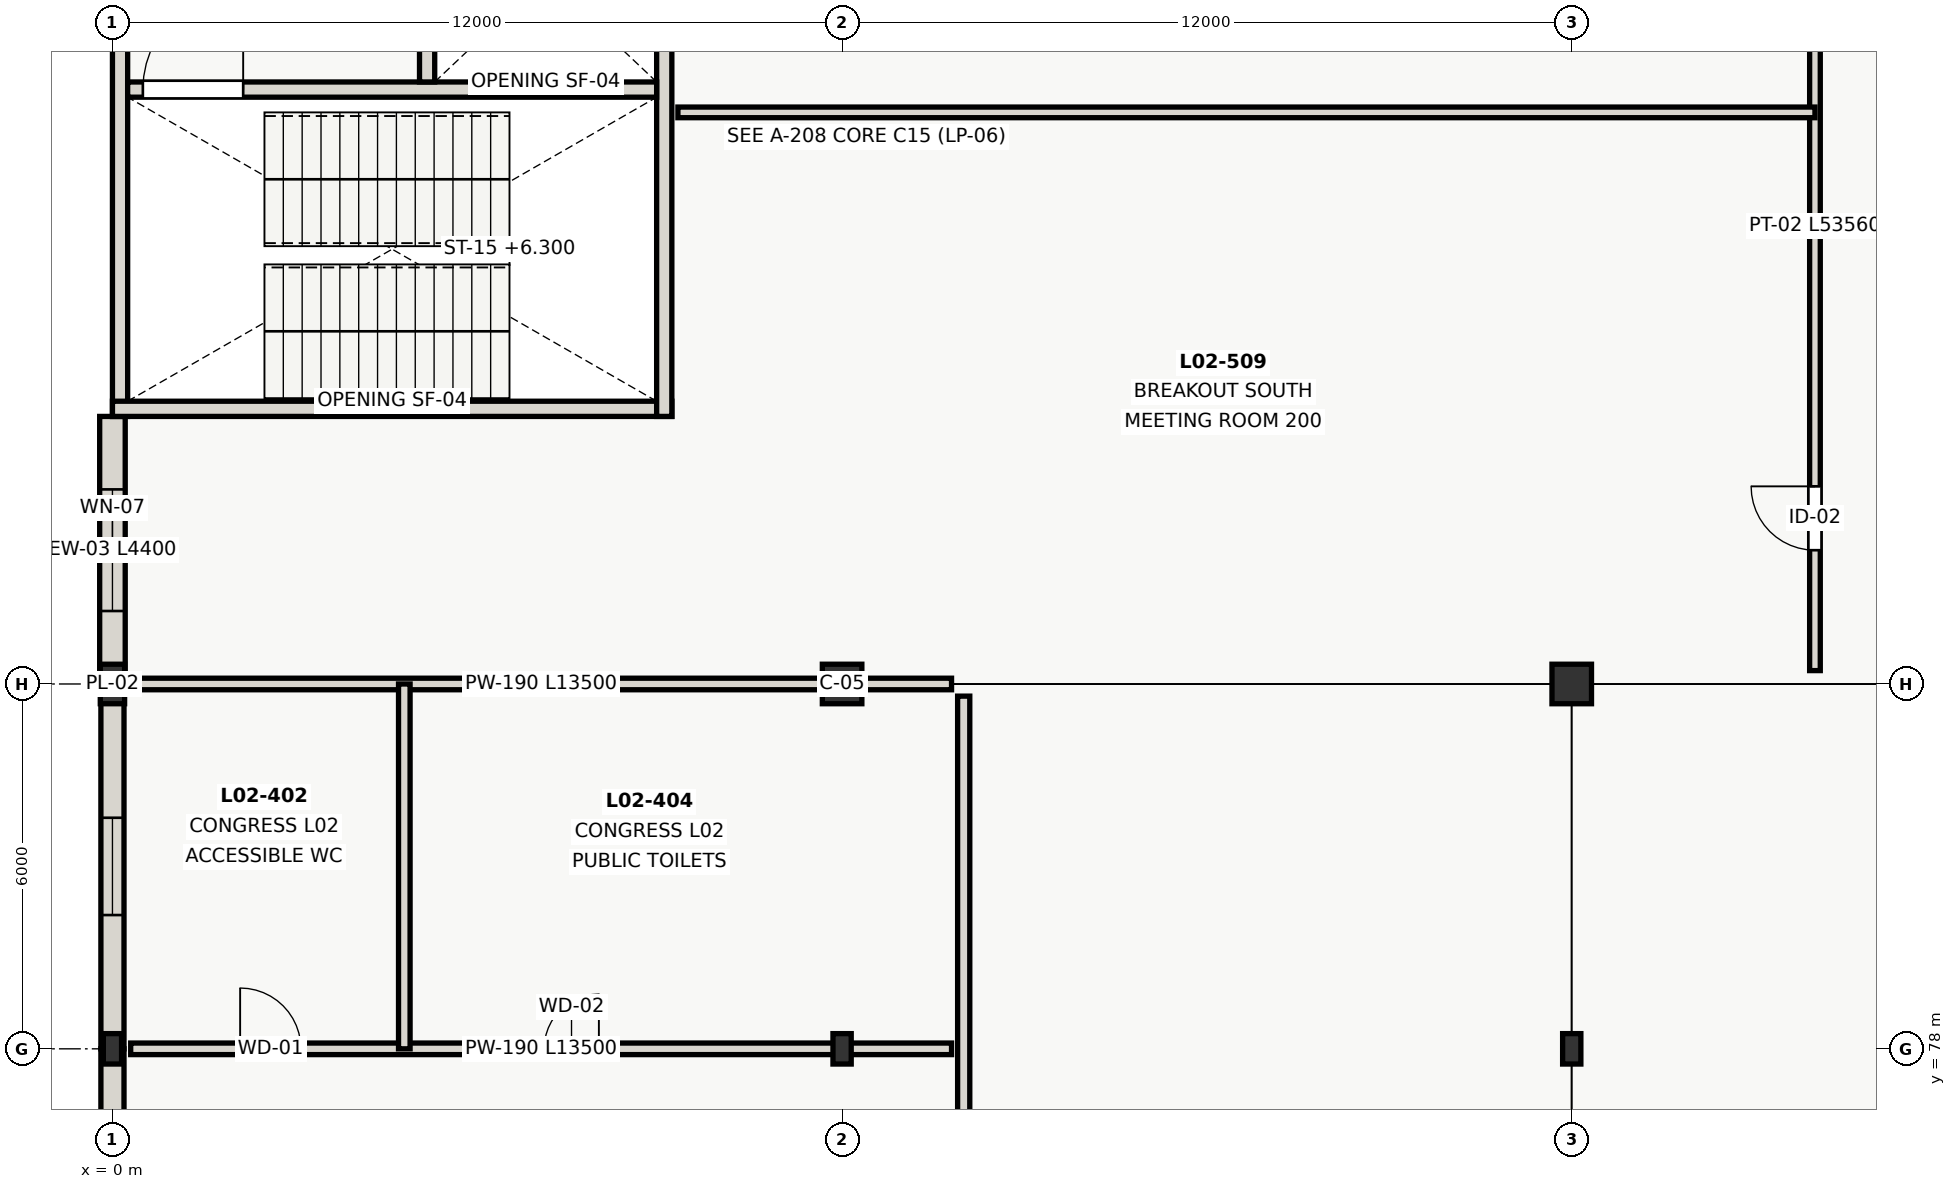
"""IFC4 building model, lengths in metres.
Left out: names, types, materials, properties, quantities, classifications, styles, units other than length and angle.
Written with IfcOpenShell. Run it as: python <this file> out.ifc"""

import sys

from ifc_helpers import new_model, si_unit, direction, frame, frame_2d, origin, origin_2d, place, context, subcontext, project, spatial, rectangle, i_section, extrude, element, fill, save


model = new_model("IFC4")
c1 = context("Model", 3, precision=1e-05, world=origin(), true_north=direction((0.0, 1.0)))
c2 = subcontext(c1, "Body", "Model", "MODEL_VIEW")
j1 = project(units=[si_unit("LENGTHUNIT", "METRE"), si_unit("PLANEANGLEUNIT", "RADIAN")], contexts=[c1])
p1 = place(None, origin())
s1 = spatial("IfcSite", under=j1, at=p1, CompositionType="ELEMENT")
p2 = place(p1, origin())
s2 = spatial("IfcBuilding", under=s1, at=p2, CompositionType="ELEMENT")
p3 = place(p2, frame((0.0, 0.0, 4.2)))
s3 = spatial("IfcBuildingStorey", under=s2, at=p3, CompositionType="ELEMENT", Elevation=4.2)
for number, where, z_axis, x_axis in (
    (1, (0.0, 78.0, 0.0), (0.0, 0.0, 1.0), (1.0, 0.0, 0.0)),
    (2, (12.0, 78.0, 0.0), (0.0, 0.0, 1.0), (1.0, 0.0, 0.0)),
    (3, (24.0, 78.0, 0.0), (0.0, 0.0, 1.0), (1.0, 0.0, 0.0)),
):
    element("IfcColumn", number, at=place(p3, frame(where, z_axis=z_axis, x_axis=x_axis)), inside=s3, PredefinedType="COLUMN", context=c2, shape_type="SweptSolid", body=[
        extrude(i_section(OverallWidth=0.3, OverallDepth=0.5, WebThickness=0.014, FlangeThickness=0.028, at=origin_2d()), origin(), (0.0, 0.0, 1.0), 4.2),
    ])
p4 = place(p3, frame((0.0, 84.0, 0.0), z_axis=(0.0, 0.0, 1.0), x_axis=(1.0, 0.0, 0.0)))
e4 = element("IfcColumn", 4, at=p4, inside=s3, PredefinedType="PILASTER", context=c2, shape_type="SweptSolid", body=[
    extrude(rectangle(XDim=0.4, YDim=0.65, at=origin_2d()), origin(), (0.0, 0.0, 1.0), 4.2),
])
for number, where, z_axis, x_axis in (
    (5, (12.0, 84.0, 0.0), (0.0, 0.0, 1.0), (1.0, 0.0, 0.0)),
    (6, (24.0, 84.0, 0.0), (0.0, 0.0, 1.0), (1.0, 0.0, 0.0)),
):
    element("IfcColumn", number, at=place(p3, frame(where, z_axis=z_axis, x_axis=x_axis)), inside=s3, PredefinedType="COLUMN", context=c2, shape_type="SweptSolid", body=[
        extrude(rectangle(XDim=0.65, YDim=0.65, at=origin_2d()), origin(), (0.0, 0.0, 1.0), 4.2),
    ])
p5 = place(p3, frame((0.0, 72.0, 0.0), z_axis=(0.0, 0.0, 1.0), x_axis=(0.0, 1.0, 0.0)))
e7 = element("IfcWall", 7, at=p5, inside=s3, PredefinedType="SOLIDWALL", context=c2, shape_type="SweptSolid", body=[
    extrude(rectangle(XDim=6.0, YDim=0.38, at=frame_2d((3.0, 0.0))), origin(), (0.0, 0.0, 1.0), 3.56),
])
p6 = place(p5, frame((2.2, 0.0, 0.9)))
e8 = element("IfcOpeningElement", 8, at=p6, cuts=e7, PredefinedType="OPENING", context=c2, shape_type="SweptSolid", body=[
    extrude(rectangle(XDim=1.6, YDim=2.0, at=frame_2d((0.8, 1.0))), frame((0.0, 0.2, 0.0), z_axis=(0.0, -1.0, 0.0), x_axis=(1.0, 0.0, 0.0)), (0.0, 0.0, 1.0), 0.4),
])
p7 = place(p3, frame((0.0, 78.0, 0.0), z_axis=(0.0, 0.0, 1.0), x_axis=(0.0, 1.0, 0.0)))
e9 = element("IfcWall", 9, at=p7, inside=s3, PredefinedType="SOLIDWALL", context=c2, shape_type="SweptSolid", body=[
    extrude(rectangle(XDim=6.0, YDim=0.38, at=frame_2d((3.0, 0.0))), origin(), (0.0, 0.0, 1.0), 3.56),
])
p8 = place(p7, frame((2.2, 0.0, 0.9)))
e10 = element("IfcOpeningElement", 10, at=p8, cuts=e9, PredefinedType="OPENING", context=c2, shape_type="SweptSolid", body=[
    extrude(rectangle(XDim=1.6, YDim=2.0, at=frame_2d((0.8, 1.0))), frame((0.0, 0.2, 0.0), z_axis=(0.0, -1.0, 0.0), x_axis=(1.0, 0.0, 0.0)), (0.0, 0.0, 1.0), 0.4),
])
p9 = place(p3, frame((0.0, 84.0, 0.0), z_axis=(0.0, 0.0, 1.0), x_axis=(0.0, 1.0, 0.0)))
e11 = element("IfcWall", 11, at=p9, inside=s3, PredefinedType="SOLIDWALL", context=c2, shape_type="SweptSolid", body=[
    extrude(rectangle(XDim=4.4, YDim=0.42, at=frame_2d((2.2, 0.0))), origin(), (0.0, 0.0, 1.0), 3.35),
])
p10 = place(p9, frame((1.2, 0.0, 0.9)))
e12 = element("IfcOpeningElement", 12, at=p10, cuts=e11, PredefinedType="OPENING", context=c2, shape_type="SweptSolid", body=[
    extrude(rectangle(XDim=2.0, YDim=2.05, at=frame_2d((1.0, 1.025))), frame((0.0, 0.22, 0.0), z_axis=(0.0, -1.0, 0.0), x_axis=(1.0, 0.0, 0.0)), (0.0, 0.0, 1.0), 0.44),
])
p11 = place(p3, frame((0.125, 88.4, 0.0), z_axis=(0.0, 0.0, 1.0), x_axis=(0.0, 1.0, 0.0)))
e13 = element("IfcWall", 13, at=p11, inside=s3, PredefinedType="SHEAR", context=c2, shape_type="SweptSolid", body=[
    extrude(rectangle(XDim=9.2, YDim=0.25, at=frame_2d((4.6, 0.0))), origin(), (0.0, 0.0, 1.0), 4.2),
])
p12 = place(p3, frame((0.0, 88.525, 0.0), z_axis=(0.0, 0.0, 1.0), x_axis=(1.0, 0.0, 0.0)))
e14 = element("IfcWall", 14, at=p12, inside=s3, PredefinedType="SHEAR", context=c2, shape_type="SweptSolid", body=[
    extrude(rectangle(XDim=9.2, YDim=0.25, at=frame_2d((4.6, 0.0))), origin(), (0.0, 0.0, 1.0), 4.2),
])
p13 = place(p3, frame((9.075, 88.4, 0.0), z_axis=(0.0, 0.0, 1.0), x_axis=(0.0, 1.0, 0.0)))
e15 = element("IfcWall", 15, at=p13, inside=s3, PredefinedType="SHEAR", context=c2, shape_type="SweptSolid", body=[
    extrude(rectangle(XDim=9.2, YDim=0.25, at=frame_2d((4.6, 0.0))), origin(), (0.0, 0.0, 1.0), 4.2),
])
p14 = place(p3, frame((0.25, 93.775, 0.0), z_axis=(0.0, 0.0, 1.0), x_axis=(1.0, 0.0, 0.0)))
e16 = element("IfcWall", 16, at=p14, inside=s3, PredefinedType="SHEAR", context=c2, shape_type="SweptSolid", body=[
    extrude(rectangle(XDim=8.7, YDim=0.25, at=frame_2d((4.35, 0.0))), origin(), (0.0, 0.0, 1.0), 4.2),
])
p15 = place(p14, frame((0.25, 0.0, 0.0)))
e17 = element("IfcOpeningElement", 17, at=p15, cuts=e16, PredefinedType="OPENING", context=c2, shape_type="SweptSolid", body=[
    extrude(rectangle(XDim=1.65, YDim=2.1, at=frame_2d((0.825, 1.05))), frame((0.0, 0.135, 0.0), z_axis=(0.0, -1.0, 0.0), x_axis=(1.0, 0.0, 0.0)), (0.0, 0.0, 1.0), 0.27),
])
p16 = place(p3, frame((5.175, 93.9, 0.0), z_axis=(0.0, 0.0, 1.0), x_axis=(0.0, 1.0, 0.0)))
e18 = element("IfcWall", 18, at=p16, inside=s3, PredefinedType="SHEAR", context=c2, shape_type="SweptSolid", body=[
    extrude(rectangle(XDim=3.45, YDim=0.25, at=frame_2d((1.725, 0.0))), origin(), (0.0, 0.0, 1.0), 4.2),
])
p17 = place(p16, frame((1.175, 0.0, 0.0)))
e19 = element("IfcOpeningElement", 19, at=p17, cuts=e18, PredefinedType="OPENING", context=c2, shape_type="SweptSolid", body=[
    extrude(rectangle(XDim=1.1, YDim=2.1, at=frame_2d((0.55, 1.05))), frame((0.0, 0.135, 0.0), z_axis=(0.0, -1.0, 0.0), x_axis=(1.0, 0.0, 0.0)), (0.0, 0.0, 1.0), 0.27),
])
p18 = place(p3, frame((14.0, 46.8, 0.0), z_axis=(0.0, 0.0, 1.0), x_axis=(0.0, 1.0, 0.0)))
e20 = element("IfcWall", 20, at=p18, inside=s3, PredefinedType="PARTITIONING", context=c2, shape_type="SweptSolid", body=[
    extrude(rectangle(XDim=37.0, YDim=0.2, at=frame_2d((18.5, 0.0))), origin(), (0.0, 0.0, 1.0), 3.72),
])
p19 = place(p18, frame((8.0, 0.0, 0.0)))
e21 = element("IfcOpeningElement", 21, at=p19, cuts=e20, PredefinedType="OPENING", context=c2, shape_type="SweptSolid", body=[
    extrude(rectangle(XDim=2.0, YDim=2.25, at=frame_2d((1.0, 1.125))), frame((0.0, 0.11, 0.0), z_axis=(0.0, -1.0, 0.0), x_axis=(1.0, 0.0, 0.0)), (0.0, 0.0, 1.0), 0.22),
])
p20 = place(p18, frame((18.0, 0.0, 0.0)))
e22 = element("IfcOpeningElement", 22, at=p20, cuts=e20, PredefinedType="OPENING", context=c2, shape_type="SweptSolid", body=[
    extrude(rectangle(XDim=2.0, YDim=2.25, at=frame_2d((1.0, 1.125))), frame((0.0, 0.11, 0.0), z_axis=(0.0, -1.0, 0.0), x_axis=(1.0, 0.0, 0.0)), (0.0, 0.0, 1.0), 0.22),
])
p21 = place(p18, frame((28.0, 0.0, 0.0)))
e23 = element("IfcOpeningElement", 23, at=p21, cuts=e20, PredefinedType="OPENING", context=c2, shape_type="SweptSolid", body=[
    extrude(rectangle(XDim=1.75, YDim=2.2, at=frame_2d((0.875, 1.1))), frame((0.0, 0.11, 0.0), z_axis=(0.0, -1.0, 0.0), x_axis=(1.0, 0.0, 0.0)), (0.0, 0.0, 1.0), 0.22),
])
p22 = place(p3, frame((0.3, 78.0, 0.0), z_axis=(0.0, 0.0, 1.0), x_axis=(1.0, 0.0, 0.0)))
e24 = element("IfcWall", 24, at=p22, inside=s3, PredefinedType="PLUMBINGWALL", context=c2, shape_type="SweptSolid", body=[
    extrude(rectangle(XDim=13.5, YDim=0.19, at=frame_2d((6.75, 0.0))), origin(), (0.0, 0.0, 1.0), 3.4),
])
p23 = place(p22, frame((1.8, 0.0, 0.0)))
e25 = element("IfcOpeningElement", 25, at=p23, cuts=e24, PredefinedType="OPENING", context=c2, shape_type="SweptSolid", body=[
    extrude(rectangle(XDim=1.0, YDim=2.1, at=frame_2d((0.5, 1.05))), frame((0.0, 0.105, 0.0), z_axis=(0.0, -1.0, 0.0), x_axis=(1.0, 0.0, 0.0)), (0.0, 0.0, 1.0), 0.21),
])
p24 = place(p22, frame((6.8, 0.0, 0.0)))
e26 = element("IfcOpeningElement", 26, at=p24, cuts=e24, PredefinedType="OPENING", context=c2, shape_type="SweptSolid", body=[
    extrude(rectangle(XDim=0.9, YDim=2.05, at=frame_2d((0.45, 1.025))), frame((0.0, 0.105, 0.0), z_axis=(0.0, -1.0, 0.0), x_axis=(1.0, 0.0, 0.0)), (0.0, 0.0, 1.0), 0.21),
])
p25 = place(p3, frame((0.3, 84.0, 0.0), z_axis=(0.0, 0.0, 1.0), x_axis=(1.0, 0.0, 0.0)))
e27 = element("IfcWall", 27, at=p25, inside=s3, PredefinedType="PLUMBINGWALL", context=c2, shape_type="SweptSolid", body=[
    extrude(rectangle(XDim=13.5, YDim=0.19, at=frame_2d((6.75, 0.0))), origin(), (0.0, 0.0, 1.0), 3.56),
])
p26 = place(p3, frame((4.8, 78.0, 0.0), z_axis=(0.0, 0.0, 1.0), x_axis=(0.0, 1.0, 0.0)))
e28 = element("IfcWall", 28, at=p26, inside=s3, PredefinedType="PLUMBINGWALL", context=c2, shape_type="SweptSolid", body=[
    extrude(rectangle(XDim=6.0, YDim=0.19, at=frame_2d((3.0, 0.0))), origin(), (0.0, 0.0, 1.0), 3.72),
])
p27 = place(p3, frame((28.0, 84.22, 0.0), z_axis=(0.0, 0.0, 1.0), x_axis=(0.0, 1.0, 0.0)))
e29 = element("IfcWall", 29, at=p27, inside=s3, PredefinedType="PARTITIONING", context=c2, shape_type="SweptSolid", body=[
    extrude(rectangle(XDim=53.56, YDim=0.175, at=frame_2d((26.78, 0.0))), origin(), (0.0, 0.0, 1.0), 3.72),
])
p28 = place(p27, frame((1.98, 0.0, 0.0)))
e30 = element("IfcOpeningElement", 30, at=p28, cuts=e29, PredefinedType="OPENING", context=c2, shape_type="SweptSolid", body=[
    extrude(rectangle(XDim=1.05, YDim=2.1, at=frame_2d((0.525, 1.05))), frame((0.0, 0.097, 0.0), z_axis=(0.0, -1.0, 0.0), x_axis=(1.0, 0.0, 0.0)), (0.0, 0.0, 1.0), 0.195),
])
p29 = place(p27, frame((10.28, 0.0, 0.0)))
e31 = element("IfcOpeningElement", 31, at=p29, cuts=e29, PredefinedType="OPENING", context=c2, shape_type="SweptSolid", body=[
    extrude(rectangle(XDim=1.8, YDim=2.15, at=frame_2d((0.9, 1.075))), frame((0.0, 0.097, 0.0), z_axis=(0.0, -1.0, 0.0), x_axis=(1.0, 0.0, 0.0)), (0.0, 0.0, 1.0), 0.195),
])
p30 = place(p27, frame((14.58, 0.0, 0.0)))
e32 = element("IfcOpeningElement", 32, at=p30, cuts=e29, PredefinedType="OPENING", context=c2, shape_type="SweptSolid", body=[
    extrude(rectangle(XDim=1.05, YDim=2.1, at=frame_2d((0.525, 1.05))), frame((0.0, 0.097, 0.0), z_axis=(0.0, -1.0, 0.0), x_axis=(1.0, 0.0, 0.0)), (0.0, 0.0, 1.0), 0.195),
])
p31 = place(p27, frame((25.78, 0.0, 0.0)))
e33 = element("IfcOpeningElement", 33, at=p31, cuts=e29, PredefinedType="OPENING", context=c2, shape_type="SweptSolid", body=[
    extrude(rectangle(XDim=1.05, YDim=2.1, at=frame_2d((0.525, 1.05))), frame((0.0, 0.097, 0.0), z_axis=(0.0, -1.0, 0.0), x_axis=(1.0, 0.0, 0.0)), (0.0, 0.0, 1.0), 0.195),
])
p32 = place(p27, frame((37.98, 0.0, 0.0)))
e34 = element("IfcOpeningElement", 34, at=p32, cuts=e29, PredefinedType="OPENING", context=c2, shape_type="SweptSolid", body=[
    extrude(rectangle(XDim=1.0, YDim=2.1, at=frame_2d((0.5, 1.05))), frame((0.0, 0.097, 0.0), z_axis=(0.0, -1.0, 0.0), x_axis=(1.0, 0.0, 0.0)), (0.0, 0.0, 1.0), 0.195),
])
p33 = place(p27, frame((47.28, 0.0, 0.0)))
e35 = element("IfcOpeningElement", 35, at=p33, cuts=e29, PredefinedType="OPENING", context=c2, shape_type="SweptSolid", body=[
    extrude(rectangle(XDim=0.98, YDim=2.1, at=frame_2d((0.49, 1.05))), frame((0.0, 0.097, 0.0), z_axis=(0.0, -1.0, 0.0), x_axis=(1.0, 0.0, 0.0)), (0.0, 0.0, 1.0), 0.195),
])
p34 = place(p3, frame((9.3, 93.4, 0.0), z_axis=(0.0, 0.0, 1.0), x_axis=(1.0, 0.0, 0.0)))
e36 = element("IfcWall", 36, at=p34, inside=s3, PredefinedType="PARTITIONING", context=c2, shape_type="SweptSolid", body=[
    extrude(rectangle(XDim=18.7, YDim=0.175, at=frame_2d((9.35, 0.0))), origin(), (0.0, 0.0, 1.0), 3.72),
])
p35 = place(p8, origin())
e37 = element("IfcWindow", 37, at=p35, inside=s3, PartitioningType="SINGLE_PANEL", PredefinedType="WINDOW", context=c2, shape_type="SweptSolid", body=[
    extrude(rectangle(XDim=1.6, YDim=2.0, at=frame_2d((0.8, 1.0))), frame((0.0, 0.03, 0.0), z_axis=(0.0, -1.0, 0.0), x_axis=(1.0, 0.0, 0.0)), (0.0, 0.0, 1.0), 0.06),
])
fill(e10, e37)
p36 = place(p10, origin())
e38 = element("IfcWindow", 38, at=p36, inside=s3, PartitioningType="SINGLE_PANEL", PredefinedType="WINDOW", context=c2, shape_type="SweptSolid", body=[
    extrude(rectangle(XDim=2.0, YDim=2.05, at=frame_2d((1.0, 1.025))), frame((0.0, 0.03, 0.0), z_axis=(0.0, -1.0, 0.0), x_axis=(1.0, 0.0, 0.0)), (0.0, 0.0, 1.0), 0.06),
])
fill(e12, e38)
p37 = place(p15, origin())
e39 = element("IfcDoor", 39, at=p37, inside=s3, OperationType="SINGLE_SWING_RIGHT", PredefinedType="DOOR", context=c2, shape_type="SweptSolid", body=[
    extrude(rectangle(XDim=1.65, YDim=2.1, at=frame_2d((0.825, 1.05))), frame((0.0, 0.025, 0.0), z_axis=(0.0, -1.0, 0.0), x_axis=(1.0, 0.0, 0.0)), (0.0, 0.0, 1.0), 0.05),
])
fill(e17, e39)
p38 = place(p23, origin())
e40 = element("IfcDoor", 40, at=p38, inside=s3, OperationType="SINGLE_SWING_LEFT", PredefinedType="DOOR", context=c2, shape_type="SweptSolid", body=[
    extrude(rectangle(XDim=1.0, YDim=2.1, at=frame_2d((0.5, 1.05))), frame((0.0, 0.025, 0.0), z_axis=(0.0, -1.0, 0.0), x_axis=(1.0, 0.0, 0.0)), (0.0, 0.0, 1.0), 0.05),
])
fill(e25, e40)
p39 = place(p24, origin())
e41 = element("IfcDoor", 41, at=p39, inside=s3, OperationType="SINGLE_SWING_RIGHT", PredefinedType="DOOR", context=c2, shape_type="SweptSolid", body=[
    extrude(rectangle(XDim=0.9, YDim=2.05, at=frame_2d((0.45, 1.025))), frame((0.0, 0.025, 0.0), z_axis=(0.0, -1.0, 0.0), x_axis=(1.0, 0.0, 0.0)), (0.0, 0.0, 1.0), 0.05),
])
fill(e26, e41)
p40 = place(p28, origin())
e42 = element("IfcDoor", 42, at=p40, inside=s3, OperationType="SINGLE_SWING_RIGHT", PredefinedType="DOOR", context=c2, shape_type="SweptSolid", body=[
    extrude(rectangle(XDim=1.05, YDim=2.1, at=frame_2d((0.525, 1.05))), frame((0.0, 0.025, 0.0), z_axis=(0.0, -1.0, 0.0), x_axis=(1.0, 0.0, 0.0)), (0.0, 0.0, 1.0), 0.05),
])
fill(e30, e42)
save(model, sys.argv[1])
